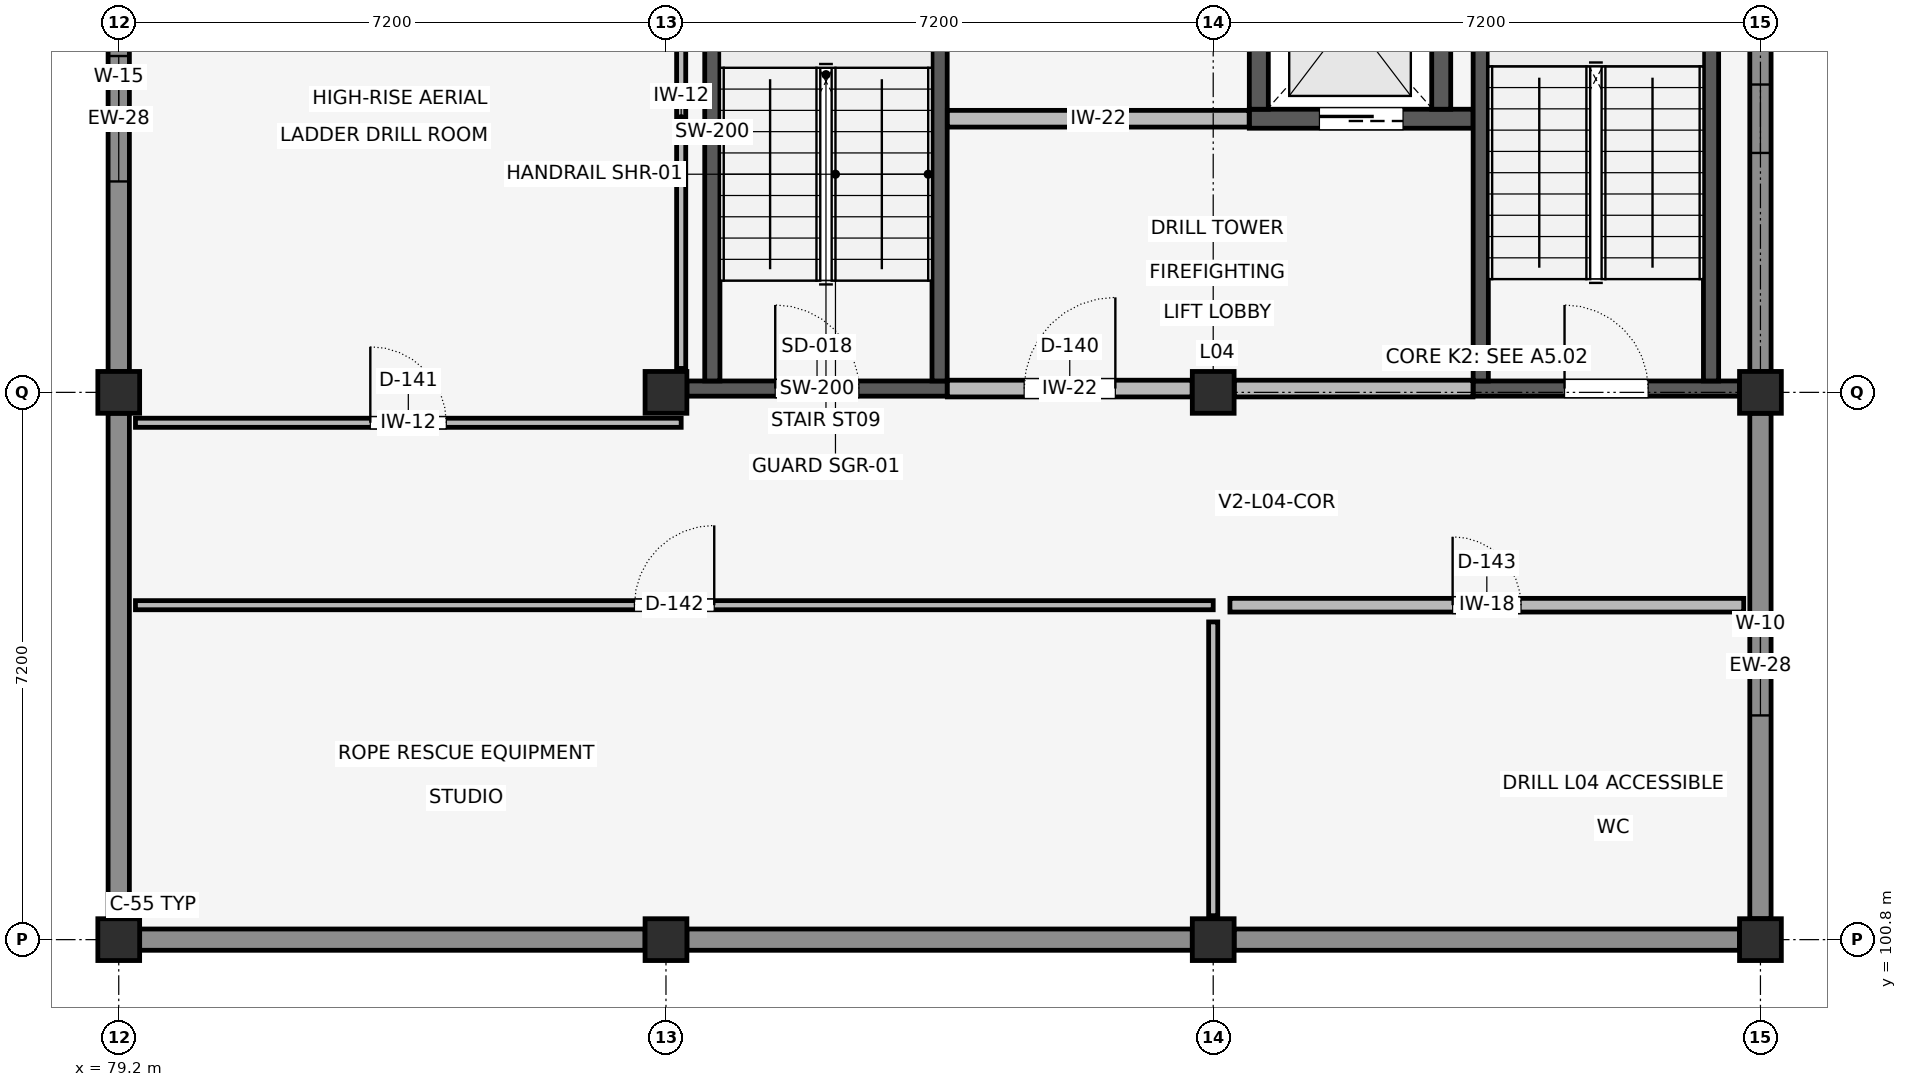
"""IFC4 building model, lengths in metres.
Left out: names, types, materials, properties, quantities, classifications, styles, units other than length and angle.
Written with IfcOpenShell. Run it as: python <this file> out.ifc"""

import sys

from ifc_helpers import new_model, si_unit, direction, frame, frame_2d, origin, origin_2d, place, context, subcontext, project, spatial, rectangle, extrude, element, fill, save


model = new_model("IFC4")
c1 = context("Model", 3, precision=1e-05, world=origin(), true_north=direction((0.0, 1.0)))
c2 = subcontext(c1, "Body", "Model", "MODEL_VIEW")
j1 = project(units=[si_unit("LENGTHUNIT", "METRE"), si_unit("PLANEANGLEUNIT", "RADIAN")], contexts=[c1])
p1 = place(None, origin())
s1 = spatial("IfcSite", under=j1, at=p1, CompositionType="ELEMENT")
p2 = place(p1, origin())
s2 = spatial("IfcBuilding", under=s1, at=p2, CompositionType="ELEMENT")
p3 = place(p2, frame((0.0, 0.0, 17.4)))
s3 = spatial("IfcBuildingStorey", under=s2, at=p3, CompositionType="ELEMENT", Elevation=17.4)
for number, where, z_axis, x_axis in (
    (1, (79.2, 100.8, 0.0), (0.0, 0.0, 1.0), (1.0, 0.0, 0.0)),
    (2, (79.2, 108.0, 0.0), (0.0, 0.0, 1.0), (1.0, 0.0, 0.0)),
    (3, (86.4, 100.8, 0.0), (0.0, 0.0, 1.0), (1.0, 0.0, 0.0)),
    (4, (86.4, 108.0, 0.0), (0.0, 0.0, 1.0), (1.0, 0.0, 0.0)),
    (5, (93.6, 100.8, 0.0), (0.0, 0.0, 1.0), (1.0, 0.0, 0.0)),
    (6, (93.6, 108.0, 0.0), (0.0, 0.0, 1.0), (1.0, 0.0, 0.0)),
    (7, (100.8, 100.8, 0.0), (0.0, 0.0, 1.0), (1.0, 0.0, 0.0)),
    (8, (100.8, 108.0, 0.0), (0.0, 0.0, 1.0), (1.0, 0.0, 0.0)),
):
    element("IfcColumn", number, at=place(p3, frame(where, z_axis=z_axis, x_axis=x_axis)), inside=s3, PredefinedType="COLUMN", context=c2, shape_type="SweptSolid", body=[
        extrude(rectangle(XDim=0.55, YDim=0.55, at=origin_2d()), origin(), (0.0, 0.0, 1.0), 3.9),
    ])
p4 = place(p3, frame((94.075, 111.6, 0.0), z_axis=(0.0, 0.0, 1.0), x_axis=(1.0, 0.0, 0.0)))
e9 = element("IfcWall", 9, at=p4, inside=s3, PredefinedType="SHEAR", context=c2, shape_type="SweptSolid", body=[
    extrude(rectangle(XDim=2.945, YDim=0.25, at=frame_2d((1.473, 0.0))), origin(), (0.0, 0.0, 1.0), 3.65),
])
p5 = place(p4, frame((0.923, 0.0, 0.0)))
e10 = element("IfcOpeningElement", 10, at=p5, cuts=e9, PredefinedType="OPENING", context=c2, shape_type="SweptSolid", body=[
    extrude(rectangle(XDim=1.1, YDim=2.15, at=frame_2d((0.55, 1.075))), frame((0.0, 0.137, 0.0), z_axis=(0.0, -1.0, 0.0), x_axis=(1.0, 0.0, 0.0)), (0.0, 0.0, 1.0), 0.274),
])
for number, where, z_axis, x_axis in (
    (11, (94.2, 111.725, 0.0), (0.0, 0.0, 1.0), (0.0, 1.0, 0.0)),
    (12, (96.6, 111.725, 0.0), (0.0, 0.0, 1.0), (0.0, 1.0, 0.0)),
):
    element("IfcWall", number, at=place(p3, frame(where, z_axis=z_axis, x_axis=x_axis)), inside=s3, PredefinedType="SHEAR", context=c2, shape_type="SweptSolid", body=[
        extrude(rectangle(XDim=2.45, YDim=0.25, at=frame_2d((1.225, 0.0))), origin(), (0.0, 0.0, 1.0), 3.65),
    ])
p6 = place(p3, frame((97.02, 108.05, 0.0), z_axis=(0.0, 0.0, 1.0), x_axis=(1.0, 0.0, 0.0)))
e13 = element("IfcWall", 13, at=p6, inside=s3, PredefinedType="SHEAR", context=c2, shape_type="SweptSolid", body=[
    extrude(rectangle(XDim=3.505, YDim=0.2, at=frame_2d((1.752, 0.0))), origin(), (0.0, 0.0, 1.0), 3.65),
])
p7 = place(p6, frame((1.202, 0.0, 0.0)))
e14 = element("IfcOpeningElement", 14, at=p7, cuts=e13, PredefinedType="OPENING", context=c2, shape_type="SweptSolid", body=[
    extrude(rectangle(XDim=1.1, YDim=2.15, at=frame_2d((0.55, 1.075))), frame((0.0, 0.112, 0.0), z_axis=(0.0, -1.0, 0.0), x_axis=(1.0, 0.0, 0.0)), (0.0, 0.0, 1.0), 0.224),
])
for number, where, z_axis, x_axis in (
    (15, (97.12, 108.15, 0.0), (0.0, 0.0, 1.0), (0.0, 1.0, 0.0)),
    (16, (100.15, 108.15, 0.0), (0.0, 0.0, 1.0), (0.0, 1.0, 0.0)),
):
    element("IfcWall", number, at=place(p3, frame(where, z_axis=z_axis, x_axis=x_axis)), inside=s3, PredefinedType="SHEAR", context=c2, shape_type="SweptSolid", body=[
        extrude(rectangle(XDim=6.6, YDim=0.2, at=frame_2d((3.3, 0.0))), origin(), (0.0, 0.0, 1.0), 3.65),
    ])
p8 = place(p3, frame((86.675, 108.05, 0.0), z_axis=(0.0, 0.0, 1.0), x_axis=(1.0, 0.0, 0.0)))
e17 = element("IfcWall", 17, at=p8, inside=s3, PredefinedType="SHEAR", context=c2, shape_type="SweptSolid", body=[
    extrude(rectangle(XDim=3.425, YDim=0.2, at=frame_2d((1.712, 0.0))), origin(), (0.0, 0.0, 1.0), 3.65),
])
p9 = place(p8, frame((1.163, 0.0, 0.0)))
e18 = element("IfcOpeningElement", 18, at=p9, cuts=e17, PredefinedType="OPENING", context=c2, shape_type="SweptSolid", body=[
    extrude(rectangle(XDim=1.1, YDim=2.15, at=frame_2d((0.55, 1.075))), frame((0.0, 0.112, 0.0), z_axis=(0.0, -1.0, 0.0), x_axis=(1.0, 0.0, 0.0)), (0.0, 0.0, 1.0), 0.224),
])
for number, where, z_axis, x_axis in (
    (19, (87.01, 108.15, 0.0), (0.0, 0.0, 1.0), (0.0, 1.0, 0.0)),
    (20, (90.0, 108.15, 0.0), (0.0, 0.0, 1.0), (0.0, 1.0, 0.0)),
):
    element("IfcWall", number, at=place(p3, frame(where, z_axis=z_axis, x_axis=x_axis)), inside=s3, PredefinedType="SHEAR", context=c2, shape_type="SweptSolid", body=[
        extrude(rectangle(XDim=6.56, YDim=0.2, at=frame_2d((3.28, 0.0))), origin(), (0.0, 0.0, 1.0), 3.65),
    ])
p10 = place(p3, frame((100.8, 101.075, 0.0), z_axis=(0.0, 0.0, 1.0), x_axis=(0.0, 1.0, 0.0)))
e21 = element("IfcWall", 21, at=p10, inside=s3, PredefinedType="ELEMENTEDWALL", context=c2, shape_type="SweptSolid", body=[
    extrude(rectangle(XDim=6.65, YDim=0.28, at=frame_2d((3.325, 0.0))), origin(), (0.0, 0.0, 1.0), 2.99),
])
p11 = place(p10, frame((2.675, 0.0, 0.85)))
e22 = element("IfcOpeningElement", 22, at=p11, cuts=e21, PredefinedType="OPENING", context=c2, shape_type="SweptSolid", body=[
    extrude(rectangle(XDim=1.3, YDim=1.85, at=frame_2d((0.65, 0.925))), frame((0.0, 0.152, 0.0), z_axis=(0.0, -1.0, 0.0), x_axis=(1.0, 0.0, 0.0)), (0.0, 0.0, 1.0), 0.304),
])
p12 = place(p3, frame((100.8, 108.275, 0.0), z_axis=(0.0, 0.0, 1.0), x_axis=(0.0, 1.0, 0.0)))
e23 = element("IfcWall", 23, at=p12, inside=s3, PredefinedType="ELEMENTEDWALL", context=c2, shape_type="SweptSolid", body=[
    extrude(rectangle(XDim=6.65, YDim=0.28, at=frame_2d((3.325, 0.0))), origin(), (0.0, 0.0, 1.0), 3.04),
])
p13 = place(p12, frame((2.875, 0.0, 0.8)))
e24 = element("IfcOpeningElement", 24, at=p13, cuts=e23, PredefinedType="OPENING", context=c2, shape_type="SweptSolid", body=[
    extrude(rectangle(XDim=0.9, YDim=2.0, at=frame_2d((0.45, 1.0))), frame((0.0, 0.152, 0.0), z_axis=(0.0, -1.0, 0.0), x_axis=(1.0, 0.0, 0.0)), (0.0, 0.0, 1.0), 0.304),
])
p14 = place(p3, frame((79.2, 114.925, 0.0), z_axis=(0.0, 0.0, 1.0), x_axis=(0.0, -1.0, 0.0)))
e25 = element("IfcWall", 25, at=p14, inside=s3, PredefinedType="ELEMENTEDWALL", context=c2, shape_type="SweptSolid", body=[
    extrude(rectangle(XDim=6.65, YDim=0.28, at=frame_2d((3.325, 0.0))), origin(), (0.0, 0.0, 1.0), 3.04),
])
p15 = place(p14, frame((2.5, 0.0, 0.85)))
e26 = element("IfcOpeningElement", 26, at=p15, cuts=e25, PredefinedType="OPENING", context=c2, shape_type="SweptSolid", body=[
    extrude(rectangle(XDim=1.65, YDim=1.9, at=frame_2d((0.825, 0.95))), frame((0.0, 0.152, 0.0), z_axis=(0.0, -1.0, 0.0), x_axis=(1.0, 0.0, 0.0)), (0.0, 0.0, 1.0), 0.304),
])
p16 = place(p3, frame((79.2, 107.725, 0.0), z_axis=(0.0, 0.0, 1.0), x_axis=(0.0, -1.0, 0.0)))
e27 = element("IfcWall", 27, at=p16, inside=s3, PredefinedType="ELEMENTEDWALL", context=c2, shape_type="SweptSolid", body=[
    extrude(rectangle(XDim=6.65, YDim=0.28, at=frame_2d((3.325, 0.0))), origin(), (0.0, 0.0, 1.0), 2.99),
])
p17 = place(p3, frame((79.475, 100.8, 0.0), z_axis=(0.0, 0.0, 1.0), x_axis=(1.0, 0.0, 0.0)))
e28 = element("IfcWall", 28, at=p17, inside=s3, PredefinedType="ELEMENTEDWALL", context=c2, shape_type="SweptSolid", body=[
    extrude(rectangle(XDim=6.65, YDim=0.28, at=frame_2d((3.325, 0.0))), origin(), (0.0, 0.0, 1.0), 2.94),
])
p18 = place(p3, frame((86.675, 100.8, 0.0), z_axis=(0.0, 0.0, 1.0), x_axis=(1.0, 0.0, 0.0)))
e29 = element("IfcWall", 29, at=p18, inside=s3, PredefinedType="ELEMENTEDWALL", context=c2, shape_type="SweptSolid", body=[
    extrude(rectangle(XDim=6.65, YDim=0.28, at=frame_2d((3.325, 0.0))), origin(), (0.0, 0.0, 1.0), 2.89),
])
p19 = place(p3, frame((93.875, 100.8, 0.0), z_axis=(0.0, 0.0, 1.0), x_axis=(1.0, 0.0, 0.0)))
e30 = element("IfcWall", 30, at=p19, inside=s3, PredefinedType="ELEMENTEDWALL", context=c2, shape_type="SweptSolid", body=[
    extrude(rectangle(XDim=6.65, YDim=0.28, at=frame_2d((3.325, 0.0))), origin(), (0.0, 0.0, 1.0), 2.94),
])
p20 = place(p3, frame((90.102, 108.05, 0.0), z_axis=(0.0, 0.0, 1.0), x_axis=(1.0, 0.0, 0.0)))
e31 = element("IfcWall", 31, at=p20, inside=s3, PredefinedType="STANDARD", context=c2, shape_type="SweptSolid", body=[
    extrude(rectangle(XDim=3.221, YDim=0.22, at=frame_2d((1.61, 0.0))), origin(), (0.0, 0.0, 1.0), 3.62),
])
p21 = place(p20, frame((1.01, 0.0, 0.0)))
e32 = element("IfcOpeningElement", 32, at=p21, cuts=e31, PredefinedType="OPENING", context=c2, shape_type="SweptSolid", body=[
    extrude(rectangle(XDim=1.2, YDim=2.2, at=frame_2d((0.6, 1.1))), frame((0.0, 0.122, 0.0), z_axis=(0.0, -1.0, 0.0), x_axis=(1.0, 0.0, 0.0)), (0.0, 0.0, 1.0), 0.244),
])
p22 = place(p3, frame((93.877, 108.05, 0.0), z_axis=(0.0, 0.0, 1.0), x_axis=(1.0, 0.0, 0.0)))
e33 = element("IfcWall", 33, at=p22, inside=s3, PredefinedType="STANDARD", context=c2, shape_type="SweptSolid", body=[
    extrude(rectangle(XDim=3.141, YDim=0.22, at=frame_2d((1.571, 0.0))), origin(), (0.0, 0.0, 1.0), 3.62),
])
p23 = place(p3, frame((90.102, 111.6, 0.0), z_axis=(0.0, 0.0, 1.0), x_axis=(1.0, 0.0, 0.0)))
e34 = element("IfcWall", 34, at=p23, inside=s3, PredefinedType="STANDARD", context=c2, shape_type="SweptSolid", body=[
    extrude(rectangle(XDim=3.971, YDim=0.22, at=frame_2d((1.985, 0.0))), origin(), (0.0, 0.0, 1.0), 3.038),
])
p24 = place(p3, frame((79.42, 107.6, 0.0), z_axis=(0.0, 0.0, 1.0), x_axis=(1.0, 0.0, 0.0)))
e35 = element("IfcWall", 35, at=p24, inside=s3, PredefinedType="PARTITIONING", context=c2, shape_type="SweptSolid", body=[
    extrude(rectangle(XDim=7.18, YDim=0.12, at=frame_2d((3.59, 0.0))), origin(), (0.0, 0.0, 1.0), 2.988),
])
p25 = place(p24, frame((3.09, 0.0, 0.0)))
e36 = element("IfcOpeningElement", 36, at=p25, cuts=e35, PredefinedType="OPENING", context=c2, shape_type="SweptSolid", body=[
    extrude(rectangle(XDim=1.0, YDim=2.15, at=frame_2d((0.5, 1.075))), frame((0.0, 0.072, 0.0), z_axis=(0.0, -1.0, 0.0), x_axis=(1.0, 0.0, 0.0)), (0.0, 0.0, 1.0), 0.144),
])
p26 = place(p3, frame((86.6, 108.315, 0.0), z_axis=(0.0, 0.0, 1.0), x_axis=(0.0, 1.0, 0.0)))
e37 = element("IfcWall", 37, at=p26, inside=s3, PredefinedType="PARTITIONING", context=c2, shape_type="SweptSolid", body=[
    extrude(rectangle(XDim=6.57, YDim=0.12, at=frame_2d((3.285, 0.0))), origin(), (0.0, 0.0, 1.0), 3.038),
])
p27 = place(p3, frame((79.42, 105.2, 0.0), z_axis=(0.0, 0.0, 1.0), x_axis=(1.0, 0.0, 0.0)))
e38 = element("IfcWall", 38, at=p27, inside=s3, PredefinedType="PARTITIONING", context=c2, shape_type="SweptSolid", body=[
    extrude(rectangle(XDim=14.18, YDim=0.12, at=frame_2d((7.09, 0.0))), origin(), (0.0, 0.0, 1.0), 2.988),
])
p28 = place(p27, frame((6.565, 0.0, 0.0)))
e39 = element("IfcOpeningElement", 39, at=p28, cuts=e38, PredefinedType="OPENING", context=c2, shape_type="SweptSolid", body=[
    extrude(rectangle(XDim=1.05, YDim=2.15, at=frame_2d((0.525, 1.075))), frame((0.0, 0.072, 0.0), z_axis=(0.0, -1.0, 0.0), x_axis=(1.0, 0.0, 0.0)), (0.0, 0.0, 1.0), 0.144),
])
p29 = place(p3, frame((93.6, 101.115, 0.0), z_axis=(0.0, 0.0, 1.0), x_axis=(0.0, 1.0, 0.0)))
e40 = element("IfcWall", 40, at=p29, inside=s3, PredefinedType="PARTITIONING", context=c2, shape_type="SweptSolid", body=[
    extrude(rectangle(XDim=3.865, YDim=0.12, at=frame_2d((1.933, 0.0))), origin(), (0.0, 0.0, 1.0), 2.988),
])
p30 = place(p3, frame((93.82, 105.2, 0.0), z_axis=(0.0, 0.0, 1.0), x_axis=(1.0, 0.0, 0.0)))
e41 = element("IfcWall", 41, at=p30, inside=s3, PredefinedType="PLUMBINGWALL", context=c2, shape_type="SweptSolid", body=[
    extrude(rectangle(XDim=6.76, YDim=0.18, at=frame_2d((3.38, 0.0))), origin(), (0.0, 0.0, 1.0), 3.62),
])
p31 = place(p30, frame((2.93, 0.0, 0.0)))
e42 = element("IfcOpeningElement", 42, at=p31, cuts=e41, PredefinedType="OPENING", context=c2, shape_type="SweptSolid", body=[
    extrude(rectangle(XDim=0.9, YDim=2.1, at=frame_2d((0.45, 1.05))), frame((0.0, 0.102, 0.0), z_axis=(0.0, -1.0, 0.0), x_axis=(1.0, 0.0, 0.0)), (0.0, 0.0, 1.0), 0.204),
])
p32 = place(p11, origin())
e43 = element("IfcWindow", 43, at=p32, inside=s3, PartitioningType="SINGLE_PANEL", PredefinedType="WINDOW", context=c2, shape_type="SweptSolid", body=[
    extrude(rectangle(XDim=1.3, YDim=1.85, at=frame_2d((0.65, 0.925))), frame((0.0, 0.03, 0.0), z_axis=(0.0, -1.0, 0.0), x_axis=(1.0, 0.0, 0.0)), (0.0, 0.0, 1.0), 0.06),
])
fill(e22, e43)
p33 = place(p13, origin())
e44 = element("IfcWindow", 44, at=p33, inside=s3, PartitioningType="SINGLE_PANEL", PredefinedType="WINDOW", context=c2, shape_type="SweptSolid", body=[
    extrude(rectangle(XDim=0.9, YDim=2.0, at=frame_2d((0.45, 1.0))), frame((0.0, 0.03, 0.0), z_axis=(0.0, -1.0, 0.0), x_axis=(1.0, 0.0, 0.0)), (0.0, 0.0, 1.0), 0.06),
])
fill(e24, e44)
p34 = place(p15, origin())
e45 = element("IfcWindow", 45, at=p34, inside=s3, PartitioningType="SINGLE_PANEL", PredefinedType="WINDOW", context=c2, shape_type="SweptSolid", body=[
    extrude(rectangle(XDim=1.65, YDim=1.9, at=frame_2d((0.825, 0.95))), frame((0.0, 0.03, 0.0), z_axis=(0.0, -1.0, 0.0), x_axis=(1.0, 0.0, 0.0)), (0.0, 0.0, 1.0), 0.06),
])
fill(e26, e45)
p35 = place(p7, origin())
e46 = element("IfcDoor", 46, at=p35, inside=s3, OperationType="SINGLE_SWING_LEFT", PredefinedType="DOOR", context=c2, shape_type="SweptSolid", body=[
    extrude(rectangle(XDim=1.1, YDim=2.15, at=frame_2d((0.55, 1.075))), frame((0.0, 0.025, 0.0), z_axis=(0.0, -1.0, 0.0), x_axis=(1.0, 0.0, 0.0)), (0.0, 0.0, 1.0), 0.05),
])
fill(e14, e46)
p36 = place(p9, origin())
e47 = element("IfcDoor", 47, at=p36, inside=s3, OperationType="SINGLE_SWING_LEFT", PredefinedType="DOOR", context=c2, shape_type="SweptSolid", body=[
    extrude(rectangle(XDim=1.1, YDim=2.15, at=frame_2d((0.55, 1.075))), frame((0.0, 0.025, 0.0), z_axis=(0.0, -1.0, 0.0), x_axis=(1.0, 0.0, 0.0)), (0.0, 0.0, 1.0), 0.05),
])
fill(e18, e47)
p37 = place(p5, origin())
e48 = element("IfcDoor", 48, at=p37, inside=s3, OperationType="SLIDING_TO_LEFT", PredefinedType="DOOR", context=c2, shape_type="SweptSolid", body=[
    extrude(rectangle(XDim=1.1, YDim=2.15, at=frame_2d((0.55, 1.075))), frame((0.0, 0.025, 0.0), z_axis=(0.0, -1.0, 0.0), x_axis=(1.0, 0.0, 0.0)), (0.0, 0.0, 1.0), 0.05),
])
fill(e10, e48)
p38 = place(p21, origin())
e49 = element("IfcDoor", 49, at=p38, inside=s3, OperationType="SINGLE_SWING_RIGHT", PredefinedType="DOOR", context=c2, shape_type="SweptSolid", body=[
    extrude(rectangle(XDim=1.2, YDim=2.2, at=frame_2d((0.6, 1.1))), frame((0.0, 0.025, 0.0), z_axis=(0.0, -1.0, 0.0), x_axis=(1.0, 0.0, 0.0)), (0.0, 0.0, 1.0), 0.05),
])
fill(e32, e49)
p39 = place(p25, origin())
e50 = element("IfcDoor", 50, at=p39, inside=s3, OperationType="SINGLE_SWING_LEFT", PredefinedType="DOOR", context=c2, shape_type="SweptSolid", body=[
    extrude(rectangle(XDim=1.0, YDim=2.15, at=frame_2d((0.5, 1.075))), frame((0.0, 0.025, 0.0), z_axis=(0.0, -1.0, 0.0), x_axis=(1.0, 0.0, 0.0)), (0.0, 0.0, 1.0), 0.05),
])
fill(e36, e50)
p40 = place(p28, origin())
e51 = element("IfcDoor", 51, at=p40, inside=s3, OperationType="SINGLE_SWING_RIGHT", PredefinedType="DOOR", context=c2, shape_type="SweptSolid", body=[
    extrude(rectangle(XDim=1.05, YDim=2.15, at=frame_2d((0.525, 1.075))), frame((0.0, 0.025, 0.0), z_axis=(0.0, -1.0, 0.0), x_axis=(1.0, 0.0, 0.0)), (0.0, 0.0, 1.0), 0.05),
])
fill(e39, e51)
p41 = place(p31, origin())
e52 = element("IfcDoor", 52, at=p41, inside=s3, OperationType="SINGLE_SWING_LEFT", PredefinedType="DOOR", context=c2, shape_type="SweptSolid", body=[
    extrude(rectangle(XDim=0.9, YDim=2.1, at=frame_2d((0.45, 1.05))), frame((0.0, 0.025, 0.0), z_axis=(0.0, -1.0, 0.0), x_axis=(1.0, 0.0, 0.0)), (0.0, 0.0, 1.0), 0.05),
])
fill(e42, e52)
save(model, sys.argv[1])
